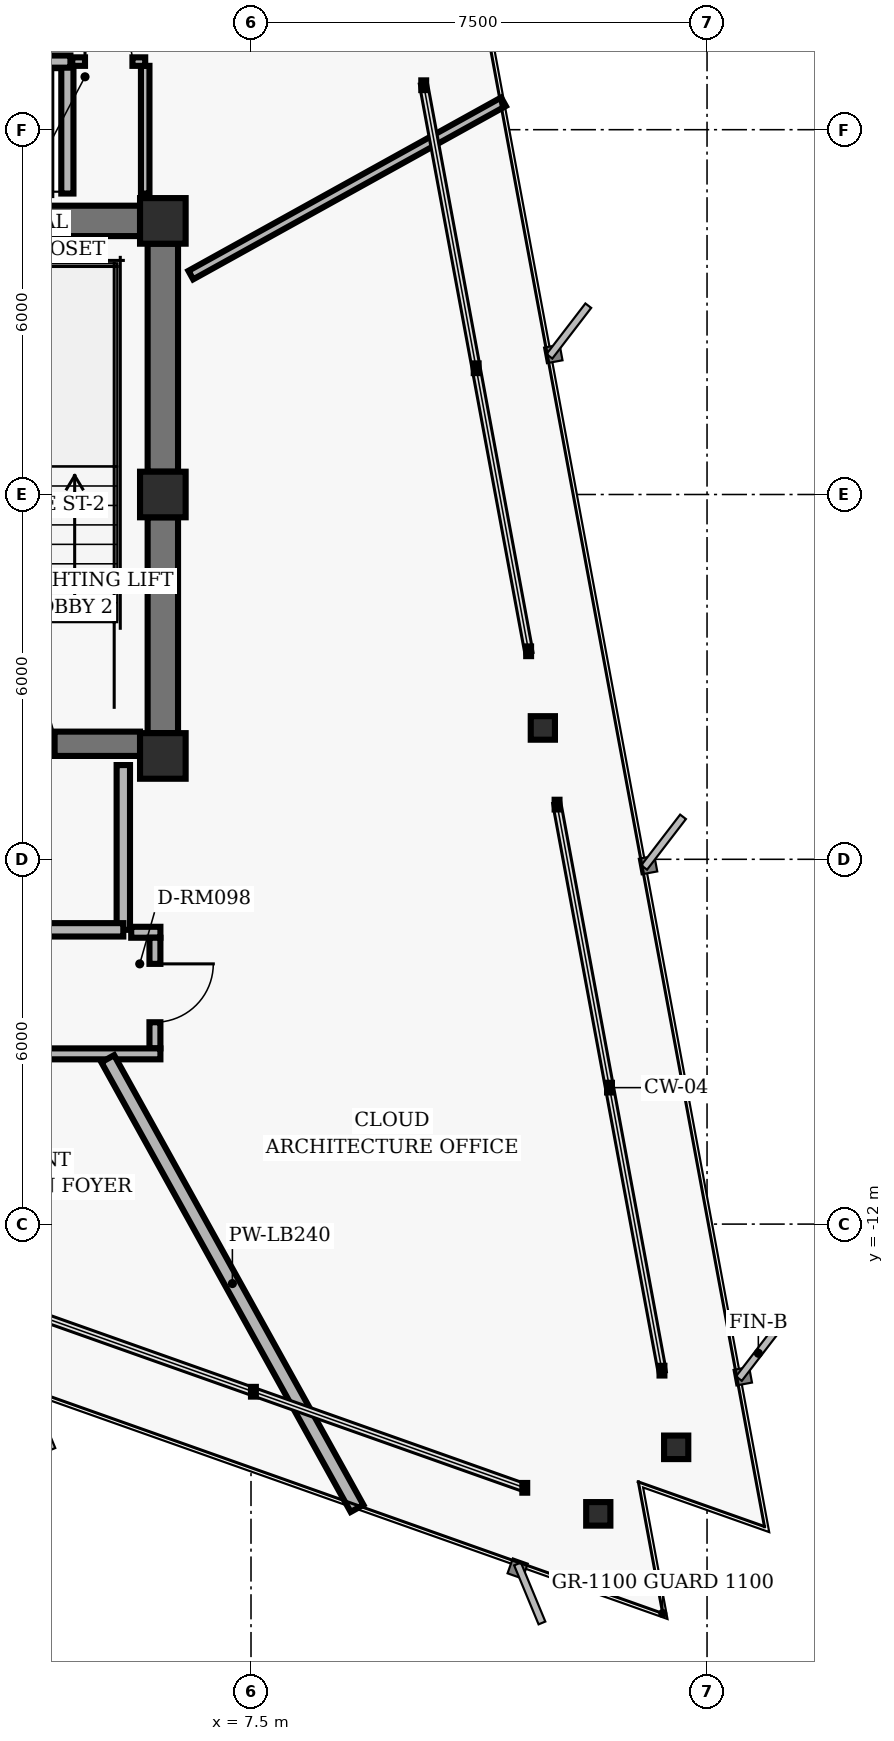
"""IFC4 building model, lengths in metres.
Left out: names, types, materials, properties, quantities, classifications, styles, units other than length and angle.
Written with IfcOpenShell. Run it as: python <this file> out.ifc"""

import sys

from ifc_helpers import new_model, si_unit, direction, frame, frame_2d, origin, origin_2d, place, context, subcontext, project, spatial, rectangle, hollow_rectangle, i_section, extrude, element, fill, save


model = new_model("IFC4")
c1 = context("Model", 3, precision=1e-05, world=origin(), true_north=direction((0.0, 1.0)))
c2 = subcontext(c1, "Body", "Model", "MODEL_VIEW")
j1 = project(units=[si_unit("LENGTHUNIT", "METRE"), si_unit("PLANEANGLEUNIT", "RADIAN")], contexts=[c1])
p1 = place(None, origin())
s1 = spatial("IfcSite", under=j1, at=p1, CompositionType="ELEMENT")
p2 = place(p1, origin())
s2 = spatial("IfcBuilding", under=s1, at=p2, CompositionType="ELEMENT")
p3 = place(p2, frame((0.0, 0.0, 181.44)))
s3 = spatial("IfcBuildingStorey", under=s2, at=p3, CompositionType="ELEMENT", Elevation=181.44)
for number, where, z_axis, x_axis in (
    (1, (6.05, 4.5, 0.0), (0.0, 0.0, 1.0), (1.0, 0.0, 0.0)),
    (2, (6.05, 0.0, 0.0), (0.0, 0.0, 1.0), (1.0, 0.0, 0.0)),
    (3, (6.05, -4.3, 0.0), (0.0, 0.0, 1.0), (1.0, 0.0, 0.0)),
):
    element("IfcColumn", number, at=place(p3, frame(where, z_axis=z_axis, x_axis=x_axis)), inside=s3, PredefinedType="COLUMN", context=c2, shape_type="SweptSolid", body=[
        extrude(hollow_rectangle(XDim=0.75, YDim=0.75, WallThickness=0.05, InnerFilletRadius=0.02, OuterFilletRadius=0.04, at=origin_2d()), origin(), (0.0, 0.0, 1.0), 3.04),
    ])
p4 = place(p3, frame((6.05, 0.375, 0.0), z_axis=(0.0, 0.0, 1.0), x_axis=(0.0, 1.0, 0.0)))
e4 = element("IfcWall", 4, at=p4, inside=s3, PredefinedType="SHEAR", context=c2, shape_type="SweptSolid", body=[
    extrude(rectangle(XDim=3.75, YDim=0.5, at=frame_2d((1.875, 0.0))), origin(), (0.0, 0.0, 1.0), 2.798),
])
p5 = place(p3, frame((6.05, -3.925, 0.0), z_axis=(0.0, 0.0, 1.0), x_axis=(0.0, 1.0, 0.0)))
e5 = element("IfcWall", 5, at=p5, inside=s3, PredefinedType="SHEAR", context=c2, shape_type="SweptSolid", body=[
    extrude(rectangle(XDim=3.55, YDim=0.5, at=frame_2d((1.775, 0.0))), origin(), (0.0, 0.0, 1.0), 2.798),
])
p6 = place(p3, frame((-5.675, -4.1, 0.0), z_axis=(0.0, 0.0, 1.0), x_axis=(1.0, 0.0, 0.0)))
e6 = element("IfcWall", 6, at=p6, inside=s3, PredefinedType="SHEAR", context=c2, shape_type="SweptSolid", body=[
    extrude(rectangle(XDim=11.35, YDim=0.4, at=frame_2d((5.675, 0.0))), origin(), (0.0, 0.0, 1.0), 2.798),
])
p7 = place(p6, frame((1.405, 0.0, 0.0)))
e7 = element("IfcOpeningElement", 7, at=p7, cuts=e6, PredefinedType="OPENING", context=c2, shape_type="SweptSolid", body=[
    extrude(rectangle(XDim=1.1, YDim=2.04, at=frame_2d((0.55, 1.02))), frame((0.0, 0.21, 0.0), z_axis=(0.0, -1.0, 0.0), x_axis=(1.0, 0.0, 0.0)), (0.0, 0.0, 1.0), 0.42),
])
p8 = place(p6, frame((8.845, 0.0, 0.0)))
e8 = element("IfcOpeningElement", 8, at=p8, cuts=e6, PredefinedType="OPENING", context=c2, shape_type="SweptSolid", body=[
    extrude(rectangle(XDim=1.1, YDim=2.04, at=frame_2d((0.55, 1.02))), frame((0.0, 0.21, 0.0), z_axis=(0.0, -1.0, 0.0), x_axis=(1.0, 0.0, 0.0)), (0.0, 0.0, 1.0), 0.42),
])
p9 = place(p6, frame((4.145, 0.0, 0.0)))
e9 = element("IfcOpeningElement", 9, at=p9, cuts=e6, PredefinedType="OPENING", context=c2, shape_type="SweptSolid", body=[
    extrude(rectangle(XDim=1.06, YDim=2.04, at=frame_2d((0.53, 1.02))), frame((0.0, 0.21, 0.0), z_axis=(0.0, -1.0, 0.0), x_axis=(1.0, 0.0, 0.0)), (0.0, 0.0, 1.0), 0.42),
])
p10 = place(p6, frame((6.145, 0.0, 0.0)))
e10 = element("IfcOpeningElement", 10, at=p10, cuts=e6, PredefinedType="OPENING", context=c2, shape_type="SweptSolid", body=[
    extrude(rectangle(XDim=1.06, YDim=2.04, at=frame_2d((0.53, 1.02))), frame((0.0, 0.21, 0.0), z_axis=(0.0, -1.0, 0.0), x_axis=(1.0, 0.0, 0.0)), (0.0, 0.0, 1.0), 0.42),
])
p11 = place(p3, frame((2.05, 4.5, 0.0), z_axis=(0.0, 0.0, 1.0), x_axis=(1.0, 0.0, 0.0)))
e11 = element("IfcWall", 11, at=p11, inside=s3, PredefinedType="SHEAR", context=c2, shape_type="SweptSolid", body=[
    extrude(rectangle(XDim=3.625, YDim=0.5, at=frame_2d((1.812, 0.0))), origin(), (0.0, 0.0, 1.0), 2.798),
])
for number, where, z_axis, x_axis in (
    (12, (14.492, -15.671, 0.0), (0.0, 0.0, 1.0), (1.0, 0.0, 0.0)),
    (13, (12.3, -3.84, 0.0), (0.0, 0.0, 1.0), (1.0, 0.0, 0.0)),
    (14, (13.211, -16.766, 0.0), (0.0, 0.0, 1.0), (1.0, 0.0, 0.0)),
):
    element("IfcColumn", number, at=place(p3, frame(where, z_axis=z_axis, x_axis=x_axis)), inside=s3, PredefinedType="COLUMN", context=c2, shape_type="SweptSolid", body=[
        extrude(i_section(OverallWidth=0.398, OverallDepth=0.387, WebThickness=0.021, FlangeThickness=0.033, FilletRadius=0.018, at=origin_2d()), origin(), (0.0, 0.0, 1.0), 3.04),
    ])
p12 = place(p3, frame((5.4, -7.16, 0.0), z_axis=(0.0, 0.0, 1.0), x_axis=(0.0, 1.0, 0.0)))
e15 = element("IfcWall", 15, at=p12, inside=s3, PredefinedType="PARTITIONING", context=c2, shape_type="SweptSolid", body=[
    extrude(rectangle(XDim=2.71, YDim=0.22, at=frame_2d((1.355, 0.0))), origin(), (0.0, 0.0, 1.0), 2.773),
])
p13 = place(p3, frame((0.0, -7.16, 0.0), z_axis=(0.0, 0.0, 1.0), x_axis=(1.0, 0.0, 0.0)))
e16 = element("IfcWall", 16, at=p13, inside=s3, PredefinedType="PARTITIONING", context=c2, shape_type="SweptSolid", body=[
    extrude(rectangle(XDim=5.4, YDim=0.22, at=frame_2d((2.7, 0.0))), origin(), (0.0, 0.0, 1.0), 2.395),
])
p14 = place(p13, frame((2.05, 0.0, 0.0)))
e17 = element("IfcOpeningElement", 17, at=p14, cuts=e16, PredefinedType="OPENING", context=c2, shape_type="SweptSolid", body=[
    extrude(rectangle(XDim=1.12, YDim=2.02, at=frame_2d((0.56, 1.01))), frame((0.0, 0.12, 0.0), z_axis=(0.0, -1.0, 0.0), x_axis=(1.0, 0.0, 0.0)), (0.0, 0.0, 1.0), 0.24),
])
p15 = place(p3, frame((4.48, 4.95, 0.0), z_axis=(0.0, 0.0, 1.0), x_axis=(0.0, 1.0, 0.0)))
e18 = element("IfcWall", 18, at=p15, inside=s3, PredefinedType="PARTITIONING", context=c2, shape_type="SweptSolid", body=[
    extrude(rectangle(XDim=2.1, YDim=0.2, at=frame_2d((1.05, 0.0))), origin(), (0.0, 0.0, 1.0), 2.773),
])
p16 = place(p3, frame((2.15, 7.12, 0.0), z_axis=(0.0, 0.0, 1.0), x_axis=(1.0, 0.0, 0.0)))
e19 = element("IfcWall", 19, at=p16, inside=s3, PredefinedType="PARTITIONING", context=c2, shape_type="SweptSolid", body=[
    extrude(rectangle(XDim=2.38, YDim=0.2, at=frame_2d((1.19, 0.0))), origin(), (0.0, 0.0, 1.0), 2.773),
])
p17 = place(p16, frame((0.56, 0.0, 0.0)))
e20 = element("IfcOpeningElement", 20, at=p17, cuts=e19, PredefinedType="OPENING", context=c2, shape_type="SweptSolid", body=[
    extrude(rectangle(XDim=1.26, YDim=2.06, at=frame_2d((0.63, 1.03))), frame((0.0, 0.11, 0.0), z_axis=(0.0, -1.0, 0.0), x_axis=(1.0, 0.0, 0.0)), (0.0, 0.0, 1.0), 0.22),
])
p18 = place(p3, frame((5.76, 4.95, 0.0), z_axis=(0.0, 0.0, 1.0), x_axis=(0.0, 1.0, 0.0)))
e21 = element("IfcWall", 21, at=p18, inside=s3, PredefinedType="PARTITIONING", context=c2, shape_type="SweptSolid", body=[
    extrude(rectangle(XDim=2.1, YDim=0.14, at=frame_2d((1.05, 0.0))), origin(), (0.0, 0.0, 1.0), 2.253),
])
p19 = place(p3, frame((4.56, 7.12, 0.0), z_axis=(0.0, 0.0, 1.0), x_axis=(1.0, 0.0, 0.0)))
e22 = element("IfcWall", 22, at=p19, inside=s3, PredefinedType="PARTITIONING", context=c2, shape_type="SweptSolid", body=[
    extrude(rectangle(XDim=1.2, YDim=0.14, at=frame_2d((0.6, 0.0))), origin(), (0.0, 0.0, 1.0), 2.773),
])
p20 = place(p19, frame((0.21, 0.0, 0.0)))
e23 = element("IfcOpeningElement", 23, at=p20, cuts=e22, PredefinedType="OPENING", context=c2, shape_type="SweptSolid", body=[
    extrude(rectangle(XDim=0.78, YDim=2.01, at=frame_2d((0.39, 1.005))), frame((0.0, 0.08, 0.0), z_axis=(0.0, -1.0, 0.0), x_axis=(1.0, 0.0, 0.0)), (0.0, 0.0, 1.0), 0.16),
])
p21 = place(p3, frame((5.53, -7.2, 0.0), z_axis=(0.0, 0.0, 1.0), x_axis=(1.0, 0.0, 0.0)))
e24 = element("IfcWall", 24, at=p21, inside=s3, PredefinedType="PARTITIONING", context=c2, shape_type="SweptSolid", body=[
    extrude(rectangle(XDim=0.48, YDim=0.18, at=frame_2d((0.24, 0.0))), origin(), (0.0, 0.0, 1.0), 2.773),
])
p22 = place(p3, frame((5.92, -7.29, 0.0), z_axis=(0.0, 0.0, 1.0), x_axis=(0.0, -1.0, 0.0)))
e25 = element("IfcWall", 25, at=p22, inside=s3, PredefinedType="PARTITIONING", context=c2, shape_type="SweptSolid", body=[
    extrude(rectangle(XDim=1.82, YDim=0.18, at=frame_2d((0.91, 0.0))), origin(), (0.0, 0.0, 1.0), 2.773),
])
p23 = place(p22, frame((0.43, 0.0, 0.0)))
e26 = element("IfcOpeningElement", 26, at=p23, cuts=e25, PredefinedType="OPENING", context=c2, shape_type="SweptSolid", body=[
    extrude(rectangle(XDim=0.96, YDim=2.02, at=frame_2d((0.48, 1.01))), frame((0.0, 0.1, 0.0), z_axis=(0.0, -1.0, 0.0), x_axis=(1.0, 0.0, 0.0)), (0.0, 0.0, 1.0), 0.2),
])
p24 = place(p3, frame((6.01, -9.2, 0.0), z_axis=(0.0, 0.0, 1.0), x_axis=(-1.0, 0.0, 0.0)))
e27 = element("IfcWall", 27, at=p24, inside=s3, PredefinedType="PARTITIONING", context=c2, shape_type="SweptSolid", body=[
    extrude(rectangle(XDim=13.3, YDim=0.18, at=frame_2d((6.65, 0.0))), origin(), (0.0, 0.0, 1.0), 2.395),
])
p25 = place(p24, frame((10.465, 0.0, 0.0)))
e28 = element("IfcOpeningElement", 28, at=p25, cuts=e27, PredefinedType="OPENING", context=c2, shape_type="SweptSolid", body=[
    extrude(rectangle(XDim=0.96, YDim=2.02, at=frame_2d((0.48, 1.01))), frame((0.0, 0.1, 0.0), z_axis=(0.0, -1.0, 0.0), x_axis=(1.0, 0.0, 0.0)), (0.0, 0.0, 1.0), 0.2),
])
p26 = place(p24, frame((4.373, 0.0, 0.0)))
e29 = element("IfcOpeningElement", 29, at=p26, cuts=e27, PredefinedType="OPENING", context=c2, shape_type="SweptSolid", body=[
    extrude(rectangle(XDim=0.96, YDim=2.02, at=frame_2d((0.48, 1.01))), frame((0.0, 0.1, 0.0), z_axis=(0.0, -1.0, 0.0), x_axis=(1.0, 0.0, 0.0)), (0.0, 0.0, 1.0), 0.2),
])
p27 = place(p3, frame((5.144, -9.28, 0.0), z_axis=(0.0, 0.0, 1.0), x_axis=(0.484804355006, -0.874622625689, 0.0)))
e30 = element("IfcWall", 30, at=p27, inside=s3, PredefinedType="PARTITIONING", context=c2, shape_type="SweptSolid", body=[
    extrude(rectangle(XDim=8.456, YDim=0.24, at=frame_2d((4.228, 0.0))), origin(), (0.0, 0.0, 1.0), 2.773),
])
p28 = place(p3, frame((6.51, 3.609, 0.0), z_axis=(0.0, 0.0, 1.0), x_axis=(0.874634801292, 0.484782388675, 0.0)))
e31 = element("IfcWall", 31, at=p28, inside=s3, PredefinedType="PARTITIONING", context=c2, shape_type="SweptSolid", body=[
    extrude(rectangle(XDim=5.879, YDim=0.16, at=frame_2d((2.939, 0.0))), origin(), (0.0, 0.0, 1.0), 2.773),
])
p29 = place(p8, origin())
e32 = element("IfcDoor", 32, at=p29, inside=s3, OperationType="SINGLE_SWING_LEFT", PredefinedType="DOOR", context=c2, shape_type="SweptSolid", body=[
    extrude(rectangle(XDim=1.1, YDim=2.04, at=frame_2d((0.55, 1.02))), frame((0.0, 0.025, 0.0), z_axis=(0.0, -1.0, 0.0), x_axis=(1.0, 0.0, 0.0)), (0.0, 0.0, 1.0), 0.05),
])
fill(e8, e32)
p30 = place(p20, origin())
e33 = element("IfcDoor", 33, at=p30, inside=s3, OperationType="SINGLE_SWING_LEFT", PredefinedType="DOOR", context=c2, shape_type="SweptSolid", body=[
    extrude(rectangle(XDim=0.78, YDim=2.01, at=frame_2d((0.39, 1.005))), frame((0.0, 0.025, 0.0), z_axis=(0.0, -1.0, 0.0), x_axis=(1.0, 0.0, 0.0)), (0.0, 0.0, 1.0), 0.05),
])
fill(e23, e33)
p31 = place(p23, origin())
e34 = element("IfcDoor", 34, at=p31, inside=s3, OperationType="SINGLE_SWING_LEFT", PredefinedType="DOOR", context=c2, shape_type="SweptSolid", body=[
    extrude(rectangle(XDim=0.96, YDim=2.02, at=frame_2d((0.48, 1.01))), frame((0.0, 0.025, 0.0), z_axis=(0.0, -1.0, 0.0), x_axis=(1.0, 0.0, 0.0)), (0.0, 0.0, 1.0), 0.05),
])
fill(e26, e34)
save(model, sys.argv[1])
